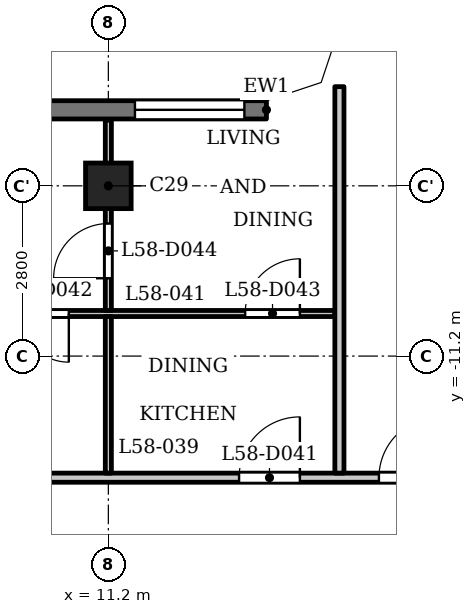
"""IFC4 building model, lengths in metres.
Left out: names, types, materials, properties, quantities, classifications, styles, units other than length and angle.
Written with IfcOpenShell. Run it as: python <this file> out.ifc"""

import sys

from ifc_helpers import new_model, si_unit, direction, frame, frame_2d, origin, origin_2d, place, context, subcontext, project, spatial, polyline, rectangle, outline, extrude, element, fill, save


model = new_model("IFC4")
c1 = context("Model", 3, precision=1e-05, world=origin(), true_north=direction((0.0, 1.0)))
c2 = subcontext(c1, "Body", "Model", "MODEL_VIEW")
j1 = project(units=[si_unit("LENGTHUNIT", "METRE"), si_unit("PLANEANGLEUNIT", "RADIAN")], contexts=[c1])
p1 = place(None, origin())
s1 = spatial("IfcSite", under=j1, at=p1, CompositionType="ELEMENT")
p2 = place(p1, origin())
s2 = spatial("IfcBuilding", under=s1, at=p2, CompositionType="ELEMENT")
p3 = place(p2, frame((0.0, 0.0, 223.9)))
s3 = spatial("IfcBuildingStorey", under=s2, at=p3, CompositionType="ELEMENT", Elevation=223.9)
p4 = place(p3, frame((11.2, -8.4, 0.0), z_axis=(0.0, 0.0, 1.0), x_axis=(1.0, 0.0, 0.0)))
e1 = element("IfcColumn", 1, at=p4, inside=s3, PredefinedType="COLUMN", context=c2, shape_type="SweptSolid", body=[
    extrude(rectangle(XDim=0.75, YDim=0.75, at=origin_2d()), origin(), (0.0, 0.0, 1.0), 3.5),
])
p5 = place(p3, frame((13.8, -7.15, 0.0), z_axis=(0.0, 0.0, 1.0), x_axis=(-1.0, 0.0, 0.0)))
e2 = element("IfcWall", 2, at=p5, inside=s3, PredefinedType="SOLIDWALL", context=c2, shape_type="SweptSolid", body=[
    extrude(rectangle(XDim=27.6, YDim=0.3, at=frame_2d((13.8, 0.0))), origin(), (0.0, 0.0, 1.0), 3.2),
])
p6 = place(p5, frame((0.363, 0.0, 0.9)))
e3 = element("IfcOpeningElement", 3, at=p6, cuts=e2, PredefinedType="OPENING", context=c2, shape_type="SweptSolid", body=[
    extrude(rectangle(XDim=1.8, YDim=1.25, at=frame_2d((0.9, 0.625))), frame((0.0, 0.16, 0.0), z_axis=(0.0, -1.0, 0.0), x_axis=(1.0, 0.0, 0.0)), (0.0, 0.0, 1.0), 0.32),
])
p7 = place(p5, frame((3.6, 0.0, 1.2)))
e4 = element("IfcOpeningElement", 4, at=p7, cuts=e2, PredefinedType="OPENING", context=c2, shape_type="SweptSolid", body=[
    extrude(rectangle(XDim=3.6, YDim=0.95, at=frame_2d((1.8, 0.475))), frame((0.0, 0.16, 0.0), z_axis=(0.0, -1.0, 0.0), x_axis=(1.0, 0.0, 0.0)), (0.0, 0.0, 1.0), 0.32),
])
p8 = place(p5, frame((9.2, 0.0, 1.2)))
e5 = element("IfcOpeningElement", 5, at=p8, cuts=e2, PredefinedType="OPENING", context=c2, shape_type="SweptSolid", body=[
    extrude(rectangle(XDim=3.6, YDim=0.95, at=frame_2d((1.8, 0.475))), frame((0.0, 0.16, 0.0), z_axis=(0.0, -1.0, 0.0), x_axis=(1.0, 0.0, 0.0)), (0.0, 0.0, 1.0), 0.32),
])
p9 = place(p5, frame((14.8, 0.0, 1.2)))
e6 = element("IfcOpeningElement", 6, at=p9, cuts=e2, PredefinedType="OPENING", context=c2, shape_type="SweptSolid", body=[
    extrude(rectangle(XDim=3.6, YDim=0.95, at=frame_2d((1.8, 0.475))), frame((0.0, 0.16, 0.0), z_axis=(0.0, -1.0, 0.0), x_axis=(1.0, 0.0, 0.0)), (0.0, 0.0, 1.0), 0.32),
])
p10 = place(p5, frame((20.4, 0.0, 1.2)))
e7 = element("IfcOpeningElement", 7, at=p10, cuts=e2, PredefinedType="OPENING", context=c2, shape_type="SweptSolid", body=[
    extrude(rectangle(XDim=3.6, YDim=0.95, at=frame_2d((1.8, 0.475))), frame((0.0, 0.16, 0.0), z_axis=(0.0, -1.0, 0.0), x_axis=(1.0, 0.0, 0.0)), (0.0, 0.0, 1.0), 0.32),
])
p11 = place(p5, frame((25.438, 0.0, 0.9)))
e8 = element("IfcOpeningElement", 8, at=p11, cuts=e2, PredefinedType="OPENING", context=c2, shape_type="SweptSolid", body=[
    extrude(rectangle(XDim=1.8, YDim=1.25, at=frame_2d((0.9, 0.625))), frame((0.0, 0.16, 0.0), z_axis=(0.0, -1.0, 0.0), x_axis=(1.0, 0.0, 0.0)), (0.0, 0.0, 1.0), 0.32),
])
p12 = place(p3, frame((-17.4, -13.2, 0.0), z_axis=(0.0, 0.0, 1.0), x_axis=(1.0, 0.0, 0.0)))
e9 = element("IfcWall", 9, at=p12, inside=s3, PredefinedType="PARTITIONING", context=c2, shape_type="SweptSolid", body=[
    extrude(rectangle(XDim=34.8, YDim=0.15, at=frame_2d((17.4, 0.0))), origin(), (0.0, 0.0, 1.0), 3.2),
])
p13 = place(p12, frame((0.65, 0.0, 0.0)))
e10 = element("IfcOpeningElement", 10, at=p13, cuts=e9, PredefinedType="OPENING", context=c2, shape_type="SweptSolid", body=[
    extrude(rectangle(XDim=1.0, YDim=2.1, at=frame_2d((0.5, 1.05))), frame((0.0, 0.085, 0.0), z_axis=(0.0, -1.0, 0.0), x_axis=(1.0, 0.0, 0.0)), (0.0, 0.0, 1.0), 0.17),
])
p14 = place(p12, frame((33.05, 0.0, 0.0)))
e11 = element("IfcOpeningElement", 11, at=p14, cuts=e9, PredefinedType="OPENING", context=c2, shape_type="SweptSolid", body=[
    extrude(rectangle(XDim=1.0, YDim=2.1, at=frame_2d((0.5, 1.05))), frame((0.0, 0.085, 0.0), z_axis=(0.0, -1.0, 0.0), x_axis=(1.0, 0.0, 0.0)), (0.0, 0.0, 1.0), 0.17),
])
p15 = place(p12, frame((10.15, 0.0, 0.0)))
e12 = element("IfcOpeningElement", 12, at=p15, cuts=e9, PredefinedType="OPENING", context=c2, shape_type="SweptSolid", body=[
    extrude(rectangle(XDim=1.0, YDim=2.1, at=frame_2d((0.5, 1.05))), frame((0.0, 0.085, 0.0), z_axis=(0.0, -1.0, 0.0), x_axis=(1.0, 0.0, 0.0)), (0.0, 0.0, 1.0), 0.17),
])
p16 = place(p12, frame((12.5, 0.0, 0.0)))
e13 = element("IfcOpeningElement", 13, at=p16, cuts=e9, PredefinedType="OPENING", context=c2, shape_type="SweptSolid", body=[
    extrude(rectangle(XDim=1.0, YDim=2.1, at=frame_2d((0.5, 1.05))), frame((0.0, 0.085, 0.0), z_axis=(0.0, -1.0, 0.0), x_axis=(1.0, 0.0, 0.0)), (0.0, 0.0, 1.0), 0.17),
])
p17 = place(p12, frame((18.0, 0.0, 0.0)))
e14 = element("IfcOpeningElement", 14, at=p17, cuts=e9, PredefinedType="OPENING", context=c2, shape_type="SweptSolid", body=[
    extrude(rectangle(XDim=1.0, YDim=2.1, at=frame_2d((0.5, 1.05))), frame((0.0, 0.085, 0.0), z_axis=(0.0, -1.0, 0.0), x_axis=(1.0, 0.0, 0.0)), (0.0, 0.0, 1.0), 0.17),
])
p18 = place(p12, frame((30.75, 0.0, 0.0)))
e15 = element("IfcOpeningElement", 15, at=p18, cuts=e9, PredefinedType="OPENING", context=c2, shape_type="SweptSolid", body=[
    extrude(rectangle(XDim=1.0, YDim=2.1, at=frame_2d((0.5, 1.05))), frame((0.0, 0.085, 0.0), z_axis=(0.0, -1.0, 0.0), x_axis=(1.0, 0.0, 0.0)), (0.0, 0.0, 1.0), 0.17),
])
p19 = place(p3, frame((-14.925, -10.5, 0.0), z_axis=(0.0, 0.0, 1.0), x_axis=(1.0, 0.0, 0.0)))
e16 = element("IfcWall", 16, at=p19, inside=s3, PredefinedType="PARTITIONING", context=c2, shape_type="SweptSolid", body=[
    extrude(rectangle(XDim=29.85, YDim=0.1, at=frame_2d((14.925, 0.0))), origin(), (0.0, 0.0, 1.0), 3.2),
])
p20 = place(p19, frame((2.325, 0.0, 0.0)))
e17 = element("IfcOpeningElement", 17, at=p20, cuts=e16, PredefinedType="OPENING", context=c2, shape_type="SweptSolid", body=[
    extrude(rectangle(XDim=0.8, YDim=2.1, at=frame_2d((0.4, 1.05))), frame((0.0, 0.06, 0.0), z_axis=(0.0, -1.0, 0.0), x_axis=(1.0, 0.0, 0.0)), (0.0, 0.0, 1.0), 0.12),
])
p21 = place(p19, frame((7.775, 0.0, 0.0)))
e18 = element("IfcOpeningElement", 18, at=p21, cuts=e16, PredefinedType="OPENING", context=c2, shape_type="SweptSolid", body=[
    extrude(rectangle(XDim=0.9, YDim=2.1, at=frame_2d((0.45, 1.05))), frame((0.0, 0.06, 0.0), z_axis=(0.0, -1.0, 0.0), x_axis=(1.0, 0.0, 0.0)), (0.0, 0.0, 1.0), 0.12),
])
p22 = place(p19, frame((13.575, 0.0, 0.0)))
e19 = element("IfcOpeningElement", 19, at=p22, cuts=e16, PredefinedType="OPENING", context=c2, shape_type="SweptSolid", body=[
    extrude(rectangle(XDim=0.8, YDim=2.1, at=frame_2d((0.4, 1.05))), frame((0.0, 0.06, 0.0), z_axis=(0.0, -1.0, 0.0), x_axis=(1.0, 0.0, 0.0)), (0.0, 0.0, 1.0), 0.12),
])
p23 = place(p19, frame((10.125, 0.0, 0.0)))
e20 = element("IfcOpeningElement", 20, at=p23, cuts=e16, PredefinedType="OPENING", context=c2, shape_type="SweptSolid", body=[
    extrude(rectangle(XDim=0.9, YDim=2.1, at=frame_2d((0.45, 1.05))), frame((0.0, 0.06, 0.0), z_axis=(0.0, -1.0, 0.0), x_axis=(1.0, 0.0, 0.0)), (0.0, 0.0, 1.0), 0.12),
])
p24 = place(p19, frame((18.825, 0.0, 0.0)))
e21 = element("IfcOpeningElement", 21, at=p24, cuts=e16, PredefinedType="OPENING", context=c2, shape_type="SweptSolid", body=[
    extrude(rectangle(XDim=0.8, YDim=2.1, at=frame_2d((0.4, 1.05))), frame((0.0, 0.06, 0.0), z_axis=(0.0, -1.0, 0.0), x_axis=(1.0, 0.0, 0.0)), (0.0, 0.0, 1.0), 0.12),
])
p25 = place(p19, frame((15.625, 0.0, 0.0)))
e22 = element("IfcOpeningElement", 22, at=p25, cuts=e16, PredefinedType="OPENING", context=c2, shape_type="SweptSolid", body=[
    extrude(rectangle(XDim=0.9, YDim=2.1, at=frame_2d((0.45, 1.05))), frame((0.0, 0.06, 0.0), z_axis=(0.0, -1.0, 0.0), x_axis=(1.0, 0.0, 0.0)), (0.0, 0.0, 1.0), 0.12),
])
p26 = place(p19, frame((24.675, 0.0, 0.0)))
e23 = element("IfcOpeningElement", 23, at=p26, cuts=e16, PredefinedType="OPENING", context=c2, shape_type="SweptSolid", body=[
    extrude(rectangle(XDim=0.8, YDim=2.1, at=frame_2d((0.4, 1.05))), frame((0.0, 0.06, 0.0), z_axis=(0.0, -1.0, 0.0), x_axis=(1.0, 0.0, 0.0)), (0.0, 0.0, 1.0), 0.12),
])
p27 = place(p19, frame((28.375, 0.0, 0.0)))
e24 = element("IfcOpeningElement", 24, at=p27, cuts=e16, PredefinedType="OPENING", context=c2, shape_type="SweptSolid", body=[
    extrude(rectangle(XDim=0.9, YDim=2.1, at=frame_2d((0.45, 1.05))), frame((0.0, 0.06, 0.0), z_axis=(0.0, -1.0, 0.0), x_axis=(1.0, 0.0, 0.0)), (0.0, 0.0, 1.0), 0.12),
])
p28 = place(p3, frame((11.2, -13.125, 0.0), z_axis=(0.0, 0.0, 1.0), x_axis=(0.0, 1.0, 0.0)))
e25 = element("IfcWall", 25, at=p28, inside=s3, PredefinedType="PARTITIONING", context=c2, shape_type="SweptSolid", body=[
    extrude(rectangle(XDim=2.575, YDim=0.1, at=frame_2d((1.288, 0.0))), origin(), (0.0, 0.0, 1.0), 3.2),
])
p29 = place(p3, frame((11.2, -10.45, 0.0), z_axis=(0.0, 0.0, 1.0), x_axis=(0.0, 1.0, 0.0)))
e26 = element("IfcWall", 26, at=p29, inside=s3, PredefinedType="PARTITIONING", context=c2, shape_type="SweptSolid", body=[
    extrude(rectangle(XDim=3.13, YDim=0.1, at=frame_2d((1.565, 0.0))), origin(), (0.0, 0.0, 1.0), 3.2),
])
p30 = place(p29, frame((0.53, 0.0, 0.0)))
e27 = element("IfcOpeningElement", 27, at=p30, cuts=e26, PredefinedType="OPENING", context=c2, shape_type="SweptSolid", body=[
    extrude(rectangle(XDim=0.9, YDim=2.1, at=frame_2d((0.45, 1.05))), frame((0.0, 0.06, 0.0), z_axis=(0.0, -1.0, 0.0), x_axis=(1.0, 0.0, 0.0)), (0.0, 0.0, 1.0), 0.12),
])
p31 = place(p3, frame((15.0, -13.125, 0.0), z_axis=(0.0, 0.0, 1.0), x_axis=(0.0, 1.0, 0.0)))
e28 = element("IfcWall", 28, at=p31, inside=s3, PredefinedType="PARTITIONING", context=c2, shape_type="SweptSolid", body=[
    extrude(rectangle(XDim=6.356, YDim=0.15, at=frame_2d((3.178, 0.0))), origin(), (0.0, 0.0, 1.0), 3.2),
])
p32 = place(p3, origin())
e29 = element("IfcWall", 29, at=p32, inside=s3, PredefinedType="SOLIDWALL", context=c2, shape_type="SweptSolid", body=[
    extrude(outline(polyline([(14.937, -6.937), (15.3, -5.849), (15.3, -5.8), (15.0, -5.8), (14.7, -6.7), (13.8, -7.0), (13.8, -7.3), (13.849, -7.3), (14.937, -6.937)])), origin(), (0.0, 0.0, 1.0), 3.2),
])
p33 = place(p14, origin())
e30 = element("IfcDoor", 30, at=p33, inside=s3, OperationType="SINGLE_SWING_LEFT", PredefinedType="DOOR", context=c2, shape_type="SweptSolid", body=[
    extrude(rectangle(XDim=1.0, YDim=2.1, at=frame_2d((0.5, 1.05))), frame((0.0, 0.025, 0.0), z_axis=(0.0, -1.0, 0.0), x_axis=(1.0, 0.0, 0.0)), (0.0, 0.0, 1.0), 0.05),
])
fill(e11, e30)
p34 = place(p18, origin())
e31 = element("IfcDoor", 31, at=p34, inside=s3, OperationType="SINGLE_SWING_LEFT", PredefinedType="DOOR", context=c2, shape_type="SweptSolid", body=[
    extrude(rectangle(XDim=1.0, YDim=2.1, at=frame_2d((0.5, 1.05))), frame((0.0, 0.025, 0.0), z_axis=(0.0, -1.0, 0.0), x_axis=(1.0, 0.0, 0.0)), (0.0, 0.0, 1.0), 0.05),
])
fill(e15, e31)
p35 = place(p26, origin())
e32 = element("IfcDoor", 32, at=p35, inside=s3, OperationType="SINGLE_SWING_RIGHT", PredefinedType="DOOR", context=c2, shape_type="SweptSolid", body=[
    extrude(rectangle(XDim=0.8, YDim=2.1, at=frame_2d((0.4, 1.05))), frame((0.0, 0.025, 0.0), z_axis=(0.0, -1.0, 0.0), x_axis=(1.0, 0.0, 0.0)), (0.0, 0.0, 1.0), 0.05),
])
fill(e23, e32)
p36 = place(p27, origin())
e33 = element("IfcDoor", 33, at=p36, inside=s3, OperationType="SINGLE_SWING_LEFT", PredefinedType="DOOR", context=c2, shape_type="SweptSolid", body=[
    extrude(rectangle(XDim=0.9, YDim=2.1, at=frame_2d((0.45, 1.05))), frame((0.0, 0.025, 0.0), z_axis=(0.0, -1.0, 0.0), x_axis=(1.0, 0.0, 0.0)), (0.0, 0.0, 1.0), 0.05),
])
fill(e24, e33)
p37 = place(p30, origin())
e34 = element("IfcDoor", 34, at=p37, inside=s3, OperationType="SINGLE_SWING_RIGHT", PredefinedType="DOOR", context=c2, shape_type="SweptSolid", body=[
    extrude(rectangle(XDim=0.9, YDim=2.1, at=frame_2d((0.45, 1.05))), frame((0.0, 0.025, 0.0), z_axis=(0.0, -1.0, 0.0), x_axis=(1.0, 0.0, 0.0)), (0.0, 0.0, 1.0), 0.05),
])
fill(e27, e34)
p38 = place(p6, origin())
e35 = element("IfcWindow", 35, at=p38, inside=s3, PartitioningType="SINGLE_PANEL", PredefinedType="WINDOW", context=c2, shape_type="SweptSolid", body=[
    extrude(rectangle(XDim=1.8, YDim=1.25, at=frame_2d((0.9, 0.625))), frame((0.0, 0.03, 0.0), z_axis=(0.0, -1.0, 0.0), x_axis=(1.0, 0.0, 0.0)), (0.0, 0.0, 1.0), 0.06),
])
fill(e3, e35)
save(model, sys.argv[1])
